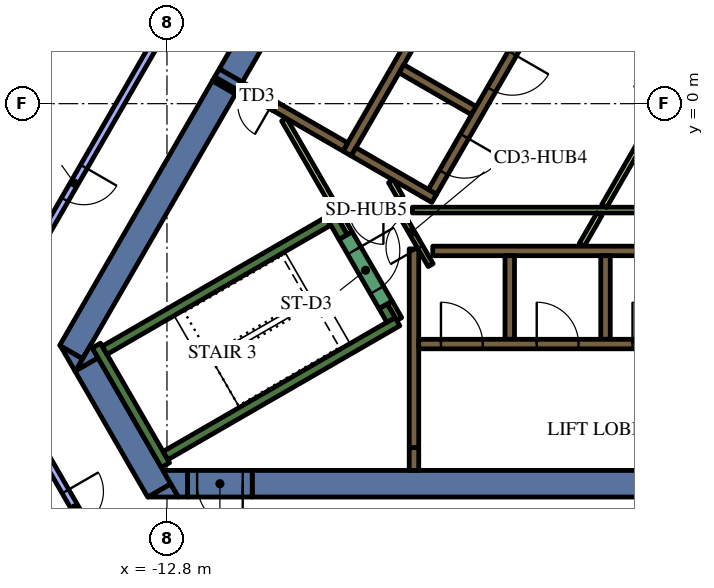
"""IFC4 building model, lengths in metres.
Left out: names, types, materials, properties, quantities, classifications, styles, units other than length and angle.
Written with IfcOpenShell. Run it as: python <this file> out.ifc"""

import sys

from ifc_helpers import new_model, si_unit, direction, frame, frame_2d, origin, place, context, subcontext, project, spatial, polyline, rectangle, outline, extrude, element, fill, save


model = new_model("IFC4")
c1 = context("Model", 3, precision=1e-05, world=origin(), true_north=direction((0.0, 1.0)))
c2 = subcontext(c1, "Body", "Model", "MODEL_VIEW")
j1 = project(units=[si_unit("LENGTHUNIT", "METRE"), si_unit("PLANEANGLEUNIT", "RADIAN")], contexts=[c1])
p1 = place(None, origin())
s1 = spatial("IfcSite", under=j1, at=p1, CompositionType="ELEMENT")
p2 = place(p1, origin())
s2 = spatial("IfcBuilding", under=s1, at=p2, CompositionType="ELEMENT")
p3 = place(p2, frame((0.0, 0.0, 205.8)))
s3 = spatial("IfcBuildingStorey", under=s2, at=p3, CompositionType="ELEMENT", Elevation=205.8)
p4 = place(p3, frame((-11.301, 0.426, 0.0), z_axis=(0.0, 0.0, 1.0), x_axis=(0.50111559984, 0.865380353138, 0.0)))
e1 = element("IfcWall", 1, at=p4, inside=s3, PredefinedType="SOLIDWALL", context=c2, shape_type="SweptSolid", body=[
    extrude(rectangle(XDim=0.121, YDim=0.7, at=frame_2d((0.061, 0.0))), origin(), (0.0, 0.0, 1.0), 4.2),
])
p5 = place(p3, frame((-15.321, -6.537, 0.0), z_axis=(0.0, 0.0, 1.0), x_axis=(0.500000268222, 0.866025248926, 0.0)))
e2 = element("IfcWall", 2, at=p5, inside=s3, PredefinedType="SOLIDWALL", context=c2, shape_type="SweptSolid", body=[
    extrude(rectangle(XDim=8.038, YDim=0.7, at=frame_2d((4.019, 0.0))), origin(), (0.0, 0.0, 1.0), 4.2),
])
p6 = place(p3, origin())
e3 = element("IfcWall", 3, at=p6, inside=s3, PredefinedType="SOLIDWALL", context=c2, shape_type="SweptSolid", body=[
    extrude(outline(polyline([(-15.213, -7.05), (-15.601, -6.378), (-15.019, -6.714), (-15.213, -7.05)])), origin(), (0.0, 0.0, 1.0), 4.2),
])
p7 = place(p3, frame((-4.696, 11.867, 0.0), z_axis=(0.0, 0.0, 1.0), x_axis=(-0.500003726532, -0.866023252259, 0.0)))
e4 = element("IfcWall", 4, at=p7, inside=s3, PredefinedType="SOLIDWALL", context=c2, shape_type="SweptSolid", body=[
    extrude(rectangle(XDim=12.848, YDim=0.7, at=frame_2d((6.424, 0.0))), origin(), (0.0, 0.0, 1.0), 4.2),
])
e5 = element("IfcWall", 5, at=p6, inside=s3, PredefinedType="SOLIDWALL", context=c2, shape_type="SweptSolid", body=[
    extrude(outline(polyline([(-11.543, 0.708), (-11.424, 0.914), (-10.843, 0.578), (-10.962, 0.372), (-11.543, 0.708)])), origin(), (0.0, 0.0, 1.0), 4.2),
])
p8 = place(p3, frame((-14.917, -6.863, 0.0), z_axis=(0.0, 0.0, 1.0), x_axis=(0.499972675833, -0.866041178825, 0.0)))
e6 = element("IfcWall", 6, at=p8, inside=s3, PredefinedType="SOLIDWALL", context=c2, shape_type="SweptSolid", body=[
    extrude(rectangle(XDim=3.829, YDim=0.7, at=frame_2d((1.915, 0.0))), origin(), (0.0, 0.0, 1.0), 4.2),
])
e7 = element("IfcWall", 7, at=p6, inside=s3, PredefinedType="SOLIDWALL", context=c2, shape_type="SweptSolid", body=[
    extrude(outline(polyline([(-14.809, -6.35), (-14.615, -6.686), (-15.197, -7.022), (-14.809, -6.35)])), origin(), (0.0, 0.0, 1.0), 4.2),
])
e8 = element("IfcWall", 8, at=p6, inside=s3, PredefinedType="SOLIDWALL", context=c2, shape_type="SweptSolid", body=[
    extrude(outline(polyline([(-12.5, -10.35), (-13.296, -10.35), (-12.698, -10.005), (-12.5, -10.35)])), origin(), (0.0, 0.0, 1.0), 4.2),
])
e9 = element("IfcWall", 9, at=p6, inside=s3, PredefinedType="SOLIDWALL", context=c2, shape_type="SweptSolid", body=[
    extrude(outline(polyline([(-12.257, -10.35), (-12.5, -10.35), (-12.904, -9.65), (-12.257, -9.65), (-12.257, -10.35)])), origin(), (0.0, 0.0, 1.0), 4.2),
])
p9 = place(p3, frame((-10.556, -10.0, 0.0), z_axis=(0.0, 0.0, 1.0), x_axis=(1.0, 0.0, 0.0)))
e10 = element("IfcWall", 10, at=p9, inside=s3, PredefinedType="SOLIDWALL", context=c2, shape_type="SweptSolid", body=[
    extrude(rectangle(XDim=19.461, YDim=0.7, at=frame_2d((9.73, 0.0))), origin(), (0.0, 0.0, 1.0), 4.2),
])
p10 = place(p3, frame((-12.84, -9.511, 0.0), z_axis=(0.0, 0.0, 1.0), x_axis=(-0.500048121057, 0.865997619297, 0.0)))
e11 = element("IfcWall", 11, at=p10, inside=s3, PredefinedType="SOLIDWALL", context=c2, shape_type="SweptSolid", body=[
    extrude(rectangle(XDim=3.634, YDim=0.25, at=frame_2d((1.817, 0.0))), origin(), (0.0, 0.0, 1.0), 4.2),
])
p11 = place(p3, frame((-14.44, -6.49, 0.0), z_axis=(0.0, 0.0, 1.0), x_axis=(0.866022966069, 0.500004222222, 0.0)))
e12 = element("IfcWall", 12, at=p11, inside=s3, PredefinedType="SOLIDWALL", context=c2, shape_type="SweptSolid", body=[
    extrude(rectangle(XDim=6.8, YDim=0.25, at=frame_2d((3.4, 0.0))), origin(), (0.0, 0.0, 1.0), 4.2),
])
p12 = place(p3, frame((-8.163, -3.511, 0.0), z_axis=(0.0, 0.0, 1.0), x_axis=(-0.499994068514, 0.866028828302, 0.0)))
e13 = element("IfcWall", 13, at=p12, inside=s3, PredefinedType="SOLIDWALL", context=c2, shape_type="SweptSolid", body=[
    extrude(rectangle(XDim=0.674, YDim=0.25, at=frame_2d((0.337, 0.0))), origin(), (0.0, 0.0, 1.0), 4.2),
])
p13 = place(p3, frame((-12.84, -9.261, 0.0), z_axis=(0.0, 0.0, 1.0), x_axis=(0.866016039709, 0.500016218704, 0.0)))
e14 = element("IfcWall", 14, at=p13, inside=s3, PredefinedType="SOLIDWALL", context=c2, shape_type="SweptSolid", body=[
    extrude(rectangle(XDim=7.05, YDim=0.25, at=frame_2d((3.525, 0.0))), origin(), (0.0, 0.0, 1.0), 4.2),
])
p14 = place(p3, frame((-6.905, -5.69, 0.0), z_axis=(0.0, 0.0, 1.0), x_axis=(-0.499993700073, 0.866029041019, 0.0)))
e15 = element("IfcWall", 15, at=p14, inside=s3, PredefinedType="SOLIDWALL", context=c2, shape_type="SweptSolid", body=[
    extrude(rectangle(XDim=0.416, YDim=0.25, at=frame_2d((0.208, 0.0))), origin(), (0.0, 0.0, 1.0), 4.2),
])
p15 = place(p3, frame((-6.3, -9.05, 0.0), z_axis=(0.0, 0.0, 1.0), x_axis=(0.0, 1.0, 0.0)))
e16 = element("IfcWall", 16, at=p15, inside=s3, PredefinedType="SOLIDWALL", context=c2, shape_type="SweptSolid", body=[
    extrude(rectangle(XDim=5.23, YDim=0.25, at=frame_2d((2.615, 0.0))), origin(), (0.0, 0.0, 1.0), 4.2),
])
p16 = place(p3, frame((-6.3, -9.052, 0.0), z_axis=(0.0, 0.0, 1.0), x_axis=(0.0, -1.0, 0.0)))
e17 = element("IfcWall", 17, at=p16, inside=s3, PredefinedType="SOLIDWALL", context=c2, shape_type="SweptSolid", body=[
    extrude(rectangle(XDim=0.598, YDim=0.25, at=frame_2d((0.299, 0.0))), origin(), (0.0, 0.0, 1.0), 4.2),
])
p17 = place(p3, frame((-5.806, -3.875, 0.0), z_axis=(0.0, 0.0, 1.0), x_axis=(1.0, 0.0, 0.0)))
e18 = element("IfcWall", 18, at=p17, inside=s3, PredefinedType="SOLIDWALL", context=c2, shape_type="SweptSolid", body=[
    extrude(rectangle(XDim=12.231, YDim=0.25, at=frame_2d((6.116, 0.0))), origin(), (0.0, 0.0, 1.0), 4.2),
])
for number, where, z_axis, x_axis in (
    (19, (-1.26, -4.0, 0.0), (0.0, 0.0, 1.0), (0.0, -1.0, 0.0)),
    (20, (-3.78, -4.0, 0.0), (0.0, 0.0, 1.0), (0.0, -1.0, 0.0)),
):
    element("IfcWall", number, at=place(p3, frame(where, z_axis=z_axis, x_axis=x_axis)), inside=s3, PredefinedType="SOLIDWALL", context=c2, shape_type="SweptSolid", body=[
        extrude(rectangle(XDim=2.2, YDim=0.25, at=frame_2d((1.1, 0.0))), origin(), (0.0, 0.0, 1.0), 4.2),
    ])
p18 = place(p3, frame((-8.06, -1.311, 0.0), z_axis=(0.0, 0.0, 1.0), x_axis=(0.50000273126, 0.866023826885, 0.0)))
e21 = element("IfcWall", 21, at=p18, inside=s3, PredefinedType="SOLIDWALL", context=c2, shape_type="SweptSolid", body=[
    extrude(rectangle(XDim=10.33, YDim=0.25, at=frame_2d((5.165, 0.0))), origin(), (0.0, 0.0, 1.0), 4.2),
])
p19 = place(p3, frame((-4.724, -0.182, 0.0), z_axis=(0.0, 0.0, 1.0), x_axis=(-0.866008176907, 0.50002983664, 0.0)))
e22 = element("IfcWall", 22, at=p19, inside=s3, PredefinedType="SOLIDWALL", context=c2, shape_type="SweptSolid", body=[
    extrude(rectangle(XDim=2.2, YDim=0.25, at=frame_2d((1.1, 0.0))), origin(), (0.0, 0.0, 1.0), 4.2),
])
p20 = place(p3, frame((-7.889, -1.265, 0.0), z_axis=(0.0, 0.0, 1.0), x_axis=(0.866057815567, -0.499943856944, 0.0)))
e23 = element("IfcWall", 23, at=p20, inside=s3, PredefinedType="SOLIDWALL", context=c2, shape_type="SweptSolid", body=[
    extrude(rectangle(XDim=2.45, YDim=0.25, at=frame_2d((1.225, 0.0))), origin(), (0.0, 0.0, 1.0), 4.2),
])
p21 = place(p3, frame((-9.95, -0.075, 0.0), z_axis=(0.0, 0.0, 1.0), x_axis=(0.865962177421, -0.500109495288, 0.0)))
e24 = element("IfcWall", 24, at=p21, inside=s3, PredefinedType="SOLIDWALL", context=c2, shape_type="SweptSolid", body=[
    extrude(rectangle(XDim=2.129, YDim=0.25, at=frame_2d((1.065, 0.0))), origin(), (0.0, 0.0, 1.0), 4.2),
])
p22 = place(p3, frame((-9.718, -0.417, 0.0), z_axis=(0.0, 0.0, 1.0), x_axis=(0.499966538646, -0.866044721844, 0.0)))
e25 = element("IfcWall", 25, at=p22, inside=s3, PredefinedType="PARTITIONING", context=c2, shape_type="SweptSolid", body=[
    extrude(rectangle(XDim=2.511, YDim=0.15, at=frame_2d((1.255, 0.0))), origin(), (0.0, 0.0, 1.0), 3.45),
])
p23 = place(p3, frame((1.438, -2.8, 0.0), z_axis=(0.0, 0.0, 1.0), x_axis=(-1.0, 0.0, 0.0)))
e26 = element("IfcWall", 26, at=p23, inside=s3, PredefinedType="PARTITIONING", context=c2, shape_type="SweptSolid", body=[
    extrude(rectangle(XDim=7.781, YDim=0.15, at=frame_2d((3.891, 0.0))), origin(), (0.0, 0.0, 1.0), 3.45),
])
p24 = place(p3, frame((-1.418, -2.907, 0.0), z_axis=(0.0, 0.0, 1.0), x_axis=(-0.499978056798, -0.866038072327, 0.0)))
e27 = element("IfcWall", 27, at=p24, inside=s3, PredefinedType="PARTITIONING", context=c2, shape_type="SweptSolid", body=[
    extrude(rectangle(XDim=0.937, YDim=0.15, at=frame_2d((0.469, 0.0))), origin(), (0.0, 0.0, 1.0), 3.45),
])
p25 = place(p3, frame((-1.295, -2.693, 0.0), z_axis=(0.0, 0.0, 1.0), x_axis=(0.500030943131, 0.866007538022, 0.0)))
e28 = element("IfcWall", 28, at=p25, inside=s3, PredefinedType="PARTITIONING", context=c2, shape_type="SweptSolid", body=[
    extrude(rectangle(XDim=2.672, YDim=0.15, at=frame_2d((1.336, 0.0))), origin(), (0.0, 0.0, 1.0), 3.45),
])
p26 = place(p3, frame((-6.653, -2.477, 0.0), z_axis=(0.0, 0.0, 1.0), x_axis=(-0.500002592159, 0.866023907196, 0.0)))
e29 = element("IfcWall", 29, at=p26, inside=s3, PredefinedType="PARTITIONING", context=c2, shape_type="SweptSolid", body=[
    extrude(rectangle(XDim=0.503, YDim=0.15, at=frame_2d((0.251, 0.0))), origin(), (0.0, 0.0, 1.0), 3.45),
])
p27 = place(p3, frame((-7.99, -3.412, 0.0), z_axis=(0.0, 0.0, 1.0), x_axis=(-0.499858525911, 0.866107068482, 0.0)))
e30 = element("IfcWall", 30, at=p27, inside=s3, PredefinedType="PARTITIONING", context=c2, shape_type="SweptSolid", body=[
    extrude(rectangle(XDim=0.466, YDim=0.15, at=frame_2d((0.233, 0.0))), origin(), (0.0, 0.0, 1.0), 3.45),
])
p28 = place(p3, frame((-6.94, -5.23, 0.0), z_axis=(0.0, 0.0, 1.0), x_axis=(0.499834152157, -0.86612113491, 0.0)))
e31 = element("IfcWall", 31, at=p28, inside=s3, PredefinedType="PARTITIONING", context=c2, shape_type="SweptSolid", body=[
    extrude(rectangle(XDim=0.505, YDim=0.15, at=frame_2d((0.252, 0.0))), origin(), (0.0, 0.0, 1.0), 4.2),
])
p29 = place(p3, frame((-6.175, -6.325, 0.0), z_axis=(0.0, 0.0, 1.0), x_axis=(1.0, 0.0, 0.0)))
e32 = element("IfcWall", 32, at=p29, inside=s3, PredefinedType="SOLIDWALL", context=c2, shape_type="SweptSolid", body=[
    extrude(rectangle(XDim=12.35, YDim=0.25, at=frame_2d((6.175, 0.0))), origin(), (0.0, 0.0, 1.0), 4.2),
])
p30 = place(p29, frame((0.585, 0.0, 0.0)))
e33 = element("IfcOpeningElement", 33, at=p30, cuts=e32, PredefinedType="OPENING", context=c2, shape_type="SweptSolid", body=[
    extrude(rectangle(XDim=1.1, YDim=2.1, at=frame_2d((0.55, 1.05))), frame((0.0, 0.135, 0.0), z_axis=(0.0, -1.0, 0.0), x_axis=(1.0, 0.0, 0.0)), (0.0, 0.0, 1.0), 0.27),
])
p31 = place(p29, frame((3.105, 0.0, 0.0)))
e34 = element("IfcOpeningElement", 34, at=p31, cuts=e32, PredefinedType="OPENING", context=c2, shape_type="SweptSolid", body=[
    extrude(rectangle(XDim=1.1, YDim=2.1, at=frame_2d((0.55, 1.05))), frame((0.0, 0.135, 0.0), z_axis=(0.0, -1.0, 0.0), x_axis=(1.0, 0.0, 0.0)), (0.0, 0.0, 1.0), 0.27),
])
p32 = place(p29, frame((5.625, 0.0, 0.0)))
e35 = element("IfcOpeningElement", 35, at=p32, cuts=e32, PredefinedType="OPENING", context=c2, shape_type="SweptSolid", body=[
    extrude(rectangle(XDim=1.1, YDim=2.1, at=frame_2d((0.55, 1.05))), frame((0.0, 0.135, 0.0), z_axis=(0.0, -1.0, 0.0), x_axis=(1.0, 0.0, 0.0)), (0.0, 0.0, 1.0), 0.27),
])
p33 = place(p29, frame((8.145, 0.0, 0.0)))
e36 = element("IfcOpeningElement", 36, at=p33, cuts=e32, PredefinedType="OPENING", context=c2, shape_type="SweptSolid", body=[
    extrude(rectangle(XDim=1.1, YDim=2.1, at=frame_2d((0.55, 1.05))), frame((0.0, 0.135, 0.0), z_axis=(0.0, -1.0, 0.0), x_axis=(1.0, 0.0, 0.0)), (0.0, 0.0, 1.0), 0.27),
])
p34 = place(p29, frame((10.665, 0.0, 0.0)))
e37 = element("IfcOpeningElement", 37, at=p34, cuts=e32, PredefinedType="OPENING", context=c2, shape_type="SweptSolid", body=[
    extrude(rectangle(XDim=1.1, YDim=2.1, at=frame_2d((0.55, 1.05))), frame((0.0, 0.135, 0.0), z_axis=(0.0, -1.0, 0.0), x_axis=(1.0, 0.0, 0.0)), (0.0, 0.0, 1.0), 0.27),
])
p35 = place(p3, frame((-0.898, 6.194, 0.0), z_axis=(0.0, 0.0, 1.0), x_axis=(-0.499996202215, -0.866027596426, 0.0)))
e38 = element("IfcWall", 38, at=p35, inside=s3, PredefinedType="SOLIDWALL", context=c2, shape_type="SweptSolid", body=[
    extrude(rectangle(XDim=9.83, YDim=0.25, at=frame_2d((4.915, 0.0))), origin(), (0.0, 0.0, 1.0), 4.2),
])
p36 = place(p35, frame((0.585, 0.0, 0.0)))
e39 = element("IfcOpeningElement", 39, at=p36, cuts=e38, PredefinedType="OPENING", context=c2, shape_type="SweptSolid", body=[
    extrude(rectangle(XDim=1.1, YDim=2.1, at=frame_2d((0.55, 1.05))), frame((0.0, 0.135, 0.0), z_axis=(0.0, -1.0, 0.0), x_axis=(1.0, 0.0, 0.0)), (0.0, 0.0, 1.0), 0.27),
])
p37 = place(p35, frame((3.105, 0.0, 0.0)))
e40 = element("IfcOpeningElement", 40, at=p37, cuts=e38, PredefinedType="OPENING", context=c2, shape_type="SweptSolid", body=[
    extrude(rectangle(XDim=1.1, YDim=2.1, at=frame_2d((0.55, 1.05))), frame((0.0, 0.135, 0.0), z_axis=(0.0, -1.0, 0.0), x_axis=(1.0, 0.0, 0.0)), (0.0, 0.0, 1.0), 0.27),
])
p38 = place(p35, frame((5.625, 0.0, 0.0)))
e41 = element("IfcOpeningElement", 41, at=p38, cuts=e38, PredefinedType="OPENING", context=c2, shape_type="SweptSolid", body=[
    extrude(rectangle(XDim=1.1, YDim=2.1, at=frame_2d((0.55, 1.05))), frame((0.0, 0.135, 0.0), z_axis=(0.0, -1.0, 0.0), x_axis=(1.0, 0.0, 0.0)), (0.0, 0.0, 1.0), 0.27),
])
p39 = place(p35, frame((8.145, 0.0, 0.0)))
e42 = element("IfcOpeningElement", 42, at=p39, cuts=e38, PredefinedType="OPENING", context=c2, shape_type="SweptSolid", body=[
    extrude(rectangle(XDim=1.1, YDim=2.1, at=frame_2d((0.55, 1.05))), frame((0.0, 0.135, 0.0), z_axis=(0.0, -1.0, 0.0), x_axis=(1.0, 0.0, 0.0)), (0.0, 0.0, 1.0), 0.27),
])
p40 = place(p3, frame((-8.098, -3.474, 0.0), z_axis=(0.0, 0.0, 1.0), x_axis=(0.49994051562, -0.866059744384, 0.0)))
e43 = element("IfcWall", 43, at=p40, inside=s3, PredefinedType="SOLIDWALL", context=c2, shape_type="SweptSolid", body=[
    extrude(rectangle(XDim=2.1, YDim=0.4, at=frame_2d((1.05, 0.0))), origin(), (0.0, 0.0, 1.0), 4.2),
])
p41 = place(p40, frame((0.45, 0.0, 0.0)))
e44 = element("IfcOpeningElement", 44, at=p41, cuts=e43, PredefinedType="OPENING", context=c2, shape_type="SweptSolid", body=[
    extrude(rectangle(XDim=1.2, YDim=2.1, at=frame_2d((0.6, 1.05))), frame((0.0, 0.21, 0.0), z_axis=(0.0, -1.0, 0.0), x_axis=(1.0, 0.0, 0.0)), (0.0, 0.0, 1.0), 0.42),
])
p42 = place(p3, frame((-5.861, -4.248, 0.0), z_axis=(0.0, 0.0, 1.0), x_axis=(-0.500043646338, 0.866000203093, 0.0)))
e45 = element("IfcWall", 45, at=p42, inside=s3, PredefinedType="PARTITIONING", context=c2, shape_type="SweptSolid", body=[
    extrude(rectangle(XDim=1.93, YDim=0.15, at=frame_2d((0.965, 0.0))), origin(), (0.0, 0.0, 1.0), 4.2),
])
p43 = place(p42, frame((0.55, 0.0, 0.0)))
e46 = element("IfcOpeningElement", 46, at=p43, cuts=e45, PredefinedType="OPENING", context=c2, shape_type="SweptSolid", body=[
    extrude(rectangle(XDim=0.9, YDim=2.1, at=frame_2d((0.45, 1.05))), frame((0.0, 0.085, 0.0), z_axis=(0.0, -1.0, 0.0), x_axis=(1.0, 0.0, 0.0)), (0.0, 0.0, 1.0), 0.17),
])
p44 = place(p3, frame((-10.556, -10.0, 0.0), z_axis=(0.0, 0.0, 1.0), x_axis=(-1.0, 0.0, 0.0)))
e47 = element("IfcWall", 47, at=p44, inside=s3, PredefinedType="SOLIDWALL", context=c2, shape_type="SweptSolid", body=[
    extrude(rectangle(XDim=1.7, YDim=0.7, at=frame_2d((0.85, 0.0))), origin(), (0.0, 0.0, 1.0), 4.2),
])
p45 = place(p44, frame((0.25, 0.0, 0.0)))
e48 = element("IfcOpeningElement", 48, at=p45, cuts=e47, PredefinedType="OPENING", context=c2, shape_type="SweptSolid", body=[
    extrude(rectangle(XDim=1.2, YDim=2.1, at=frame_2d((0.6, 1.05))), frame((0.0, 0.36, 0.0), z_axis=(0.0, -1.0, 0.0), x_axis=(1.0, 0.0, 0.0)), (0.0, 0.0, 1.0), 0.72),
])
p46 = place(p3, frame((-6.655, -2.8, 0.0), z_axis=(0.0, 0.0, 1.0), x_axis=(-1.0, 0.0, 0.0)))
e49 = element("IfcWall", 49, at=p46, inside=s3, PredefinedType="PARTITIONING", context=c2, shape_type="SweptSolid", body=[
    extrude(rectangle(XDim=1.8, YDim=0.15, at=frame_2d((0.9, 0.0))), origin(), (0.0, 0.0, 1.0), 3.45),
])
p47 = place(p46, frame((0.45, 0.0, 0.0)))
e50 = element("IfcOpeningElement", 50, at=p47, cuts=e49, PredefinedType="OPENING", context=c2, shape_type="SweptSolid", body=[
    extrude(rectangle(XDim=0.9, YDim=2.1, at=frame_2d((0.45, 1.05))), frame((0.0, 0.085, 0.0), z_axis=(0.0, -1.0, 0.0), x_axis=(1.0, 0.0, 0.0)), (0.0, 0.0, 1.0), 0.17),
])
p48 = place(p3, frame((-9.95, -0.075, 0.0), z_axis=(0.0, 0.0, 1.0), x_axis=(-0.865952669392, 0.500125958508, 0.0)))
e51 = element("IfcWall", 51, at=p48, inside=s3, PredefinedType="SOLIDWALL", context=c2, shape_type="SweptSolid", body=[
    extrude(rectangle(XDim=1.1, YDim=0.25, at=frame_2d((0.55, 0.0))), origin(), (0.0, 0.0, 1.0), 4.2),
])
p49 = place(p48, frame((0.1, 0.0, 0.0)))
e52 = element("IfcOpeningElement", 52, at=p49, cuts=e51, PredefinedType="OPENING", context=c2, shape_type="SweptSolid", body=[
    extrude(rectangle(XDim=0.9, YDim=2.1, at=frame_2d((0.45, 1.05))), frame((0.0, 0.135, 0.0), z_axis=(0.0, -1.0, 0.0), x_axis=(1.0, 0.0, 0.0)), (0.0, 0.0, 1.0), 0.27),
])
p50 = place(p3, frame((-12.787, 2.152, 0.0), z_axis=(0.0, 0.0, 1.0), x_axis=(-0.50000660679, -0.866021589319, 0.0)))
e53 = element("IfcWall", 53, at=p50, inside=s3, PredefinedType="PARTITIONING", context=c2, shape_type="SweptSolid", body=[
    extrude(rectangle(XDim=9.817, YDim=0.2, at=frame_2d((4.909, 0.0))), origin(), (0.0, 0.0, 1.0), 3.45),
])
p51 = place(p50, frame((4.4, 0.0, 0.0)))
e54 = element("IfcOpeningElement", 54, at=p51, cuts=e53, PredefinedType="OPENING", context=c2, shape_type="SweptSolid", body=[
    extrude(rectangle(XDim=1.0, YDim=2.1, at=frame_2d((0.5, 1.05))), frame((0.0, 0.11, 0.0), z_axis=(0.0, -1.0, 0.0), x_axis=(1.0, 0.0, 0.0)), (0.0, 0.0, 1.0), 0.22),
])
p52 = place(p3, frame((-15.971, -9.337, 0.0), z_axis=(0.0, 0.0, 1.0), x_axis=(0.500007233661, -0.866021227388, 0.0)))
e55 = element("IfcWall", 55, at=p52, inside=s3, PredefinedType="PARTITIONING", context=c2, shape_type="SweptSolid", body=[
    extrude(rectangle(XDim=2.919, YDim=0.2, at=frame_2d((1.459, 0.0))), origin(), (0.0, 0.0, 1.0), 3.45),
])
p53 = place(p52, frame((1.0, 0.0, 0.0)))
e56 = element("IfcOpeningElement", 56, at=p53, cuts=e55, PredefinedType="OPENING", context=c2, shape_type="SweptSolid", body=[
    extrude(rectangle(XDim=1.0, YDim=2.1, at=frame_2d((0.5, 1.05))), frame((0.0, 0.11, 0.0), z_axis=(0.0, -1.0, 0.0), x_axis=(1.0, 0.0, 0.0)), (0.0, 0.0, 1.0), 0.22),
])
p54 = place(p30, origin())
e57 = element("IfcDoor", 57, at=p54, inside=s3, OperationType="DOUBLE_DOOR_SLIDING", PredefinedType="DOOR", context=c2, shape_type="SweptSolid", body=[
    extrude(rectangle(XDim=1.1, YDim=2.1, at=frame_2d((0.55, 1.05))), frame((0.0, 0.025, 0.0), z_axis=(0.0, -1.0, 0.0), x_axis=(1.0, 0.0, 0.0)), (0.0, 0.0, 1.0), 0.05),
])
fill(e33, e57)
p55 = place(p31, origin())
e58 = element("IfcDoor", 58, at=p55, inside=s3, OperationType="DOUBLE_DOOR_SLIDING", PredefinedType="DOOR", context=c2, shape_type="SweptSolid", body=[
    extrude(rectangle(XDim=1.1, YDim=2.1, at=frame_2d((0.55, 1.05))), frame((0.0, 0.025, 0.0), z_axis=(0.0, -1.0, 0.0), x_axis=(1.0, 0.0, 0.0)), (0.0, 0.0, 1.0), 0.05),
])
fill(e34, e58)
p56 = place(p32, origin())
e59 = element("IfcDoor", 59, at=p56, inside=s3, OperationType="DOUBLE_DOOR_SLIDING", PredefinedType="DOOR", context=c2, shape_type="SweptSolid", body=[
    extrude(rectangle(XDim=1.1, YDim=2.1, at=frame_2d((0.55, 1.05))), frame((0.0, 0.025, 0.0), z_axis=(0.0, -1.0, 0.0), x_axis=(1.0, 0.0, 0.0)), (0.0, 0.0, 1.0), 0.05),
])
fill(e35, e59)
p57 = place(p38, origin())
e60 = element("IfcDoor", 60, at=p57, inside=s3, OperationType="DOUBLE_DOOR_SLIDING", PredefinedType="DOOR", context=c2, shape_type="SweptSolid", body=[
    extrude(rectangle(XDim=1.1, YDim=2.1, at=frame_2d((0.55, 1.05))), frame((0.0, 0.025, 0.0), z_axis=(0.0, -1.0, 0.0), x_axis=(1.0, 0.0, 0.0)), (0.0, 0.0, 1.0), 0.05),
])
fill(e41, e60)
p58 = place(p39, origin())
e61 = element("IfcDoor", 61, at=p58, inside=s3, OperationType="DOUBLE_DOOR_SLIDING", PredefinedType="DOOR", context=c2, shape_type="SweptSolid", body=[
    extrude(rectangle(XDim=1.1, YDim=2.1, at=frame_2d((0.55, 1.05))), frame((0.0, 0.025, 0.0), z_axis=(0.0, -1.0, 0.0), x_axis=(1.0, 0.0, 0.0)), (0.0, 0.0, 1.0), 0.05),
])
fill(e42, e61)
p59 = place(p41, origin())
e62 = element("IfcDoor", 62, at=p59, inside=s3, OperationType="SINGLE_SWING_LEFT", PredefinedType="DOOR", context=c2, shape_type="SweptSolid", body=[
    extrude(rectangle(XDim=1.2, YDim=2.1, at=frame_2d((0.6, 1.05))), frame((0.0, 0.025, 0.0), z_axis=(0.0, -1.0, 0.0), x_axis=(1.0, 0.0, 0.0)), (0.0, 0.0, 1.0), 0.05),
])
fill(e44, e62)
p60 = place(p43, origin())
e63 = element("IfcDoor", 63, at=p60, inside=s3, OperationType="SINGLE_SWING_LEFT", PredefinedType="DOOR", context=c2, shape_type="SweptSolid", body=[
    extrude(rectangle(XDim=0.9, YDim=2.1, at=frame_2d((0.45, 1.05))), frame((0.0, 0.025, 0.0), z_axis=(0.0, -1.0, 0.0), x_axis=(1.0, 0.0, 0.0)), (0.0, 0.0, 1.0), 0.05),
])
fill(e46, e63)
p61 = place(p45, origin())
e64 = element("IfcDoor", 64, at=p61, inside=s3, OperationType="SINGLE_SWING_LEFT", PredefinedType="DOOR", context=c2, shape_type="SweptSolid", body=[
    extrude(rectangle(XDim=1.2, YDim=2.1, at=frame_2d((0.6, 1.05))), frame((0.0, 0.025, 0.0), z_axis=(0.0, -1.0, 0.0), x_axis=(1.0, 0.0, 0.0)), (0.0, 0.0, 1.0), 0.05),
])
fill(e48, e64)
p62 = place(p47, origin())
e65 = element("IfcDoor", 65, at=p62, inside=s3, OperationType="SINGLE_SWING_LEFT", PredefinedType="DOOR", context=c2, shape_type="SweptSolid", body=[
    extrude(rectangle(XDim=0.9, YDim=2.1, at=frame_2d((0.45, 1.05))), frame((0.0, 0.025, 0.0), z_axis=(0.0, -1.0, 0.0), x_axis=(1.0, 0.0, 0.0)), (0.0, 0.0, 1.0), 0.05),
])
fill(e50, e65)
p63 = place(p49, origin())
e66 = element("IfcDoor", 66, at=p63, inside=s3, OperationType="SINGLE_SWING_LEFT", PredefinedType="DOOR", context=c2, shape_type="SweptSolid", body=[
    extrude(rectangle(XDim=0.9, YDim=2.1, at=frame_2d((0.45, 1.05))), frame((0.0, 0.025, 0.0), z_axis=(0.0, -1.0, 0.0), x_axis=(1.0, 0.0, 0.0)), (0.0, 0.0, 1.0), 0.05),
])
fill(e52, e66)
p64 = place(p51, origin())
e67 = element("IfcDoor", 67, at=p64, inside=s3, OperationType="SINGLE_SWING_LEFT", PredefinedType="DOOR", context=c2, shape_type="SweptSolid", body=[
    extrude(rectangle(XDim=1.0, YDim=2.1, at=frame_2d((0.5, 1.05))), frame((0.0, 0.025, 0.0), z_axis=(0.0, -1.0, 0.0), x_axis=(1.0, 0.0, 0.0)), (0.0, 0.0, 1.0), 0.05),
])
fill(e54, e67)
p65 = place(p53, origin())
e68 = element("IfcDoor", 68, at=p65, inside=s3, OperationType="SINGLE_SWING_RIGHT", PredefinedType="DOOR", context=c2, shape_type="SweptSolid", body=[
    extrude(rectangle(XDim=1.0, YDim=2.1, at=frame_2d((0.5, 1.05))), frame((0.0, 0.025, 0.0), z_axis=(0.0, -1.0, 0.0), x_axis=(1.0, 0.0, 0.0)), (0.0, 0.0, 1.0), 0.05),
])
fill(e56, e68)
save(model, sys.argv[1])
